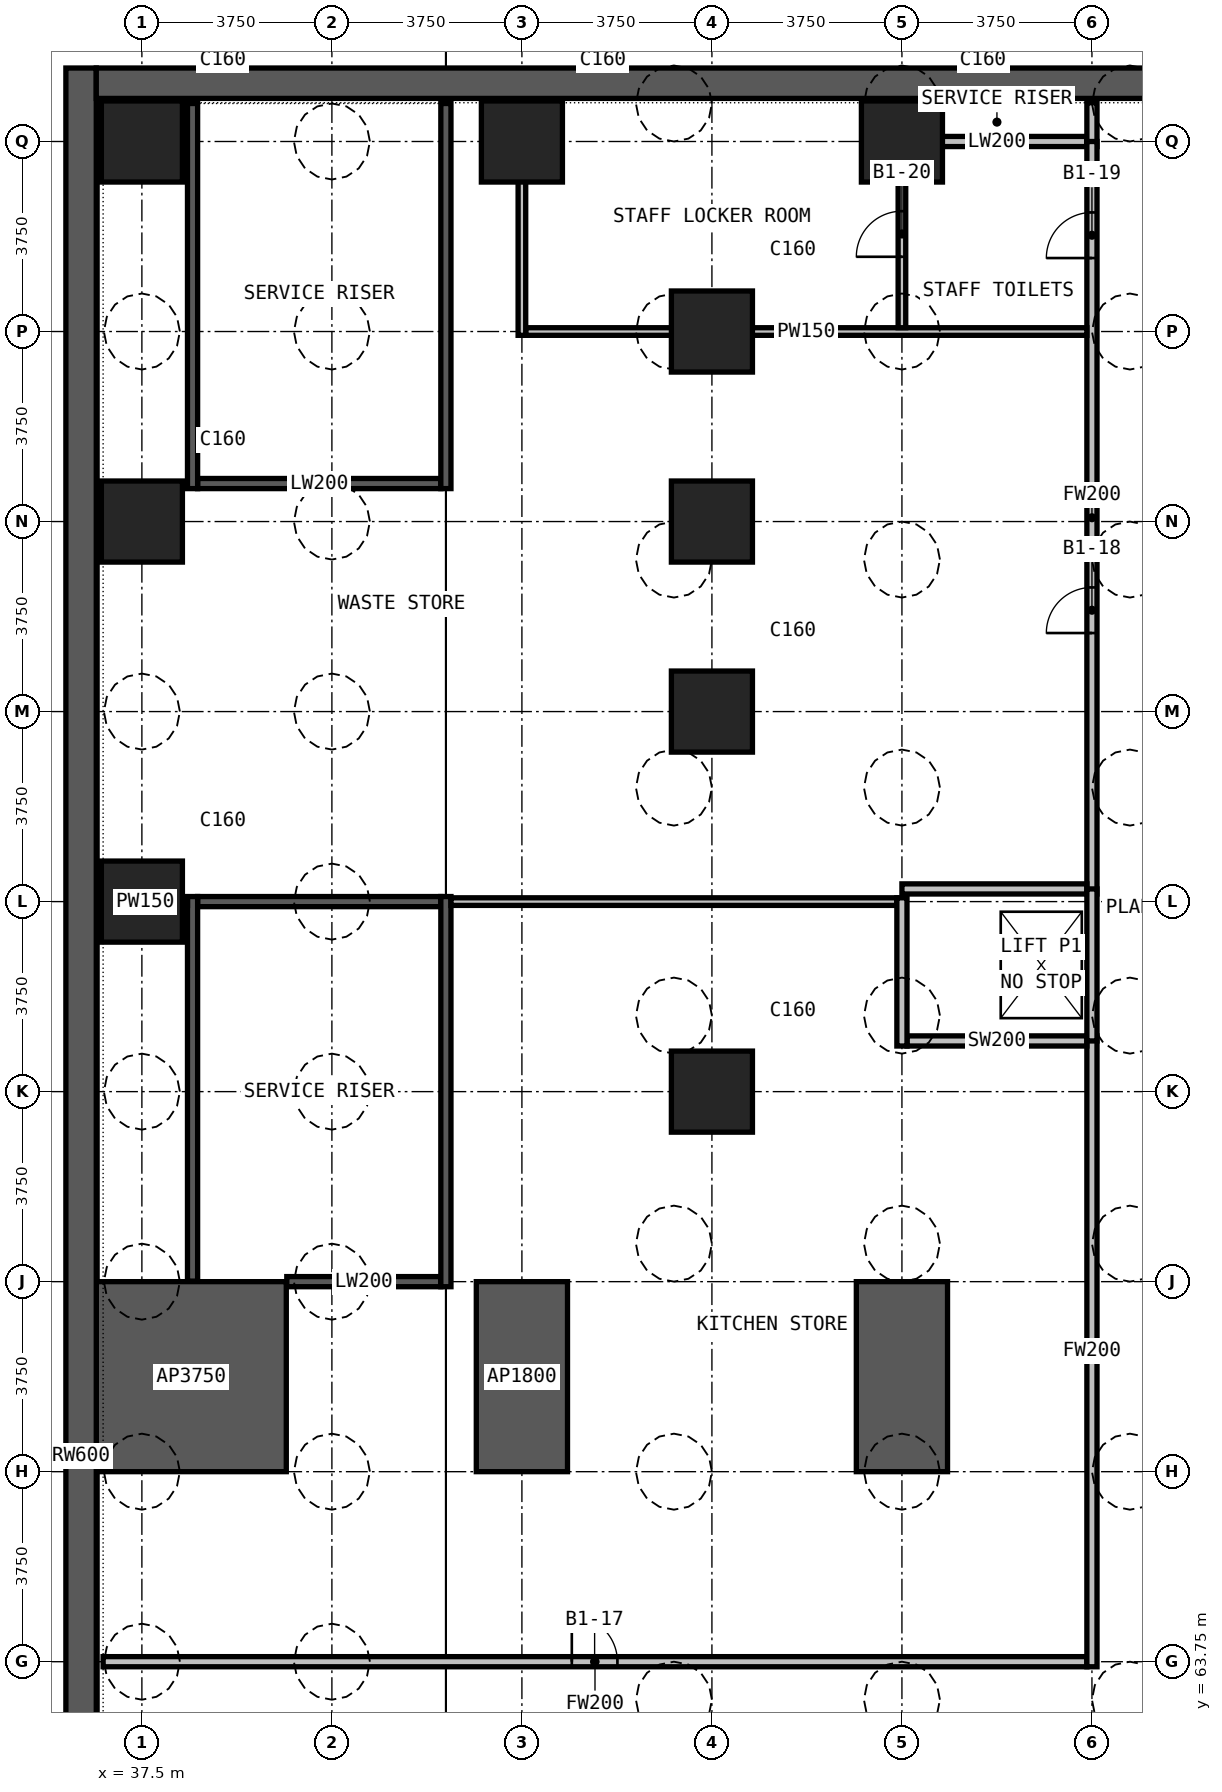
"""IFC4 building model, lengths in metres.
Left out: names, types, materials, properties, quantities, classifications, styles, units other than length and angle.
Written with IfcOpenShell. Run it as: python <this file> out.ifc"""

import sys

from ifc_helpers import new_model, si_unit, direction, frame, frame_2d, origin, origin_2d, place, context, subcontext, project, spatial, rectangle, extrude, element, fill, save


model = new_model("IFC4")
c1 = context("Model", 3, precision=1e-05, world=origin(), true_north=direction((0.0, 1.0)))
c2 = subcontext(c1, "Body", "Model", "MODEL_VIEW")
j1 = project(units=[si_unit("LENGTHUNIT", "METRE"), si_unit("PLANEANGLEUNIT", "RADIAN")], contexts=[c1])
p1 = place(None, origin())
s1 = spatial("IfcSite", under=j1, at=p1, CompositionType="ELEMENT")
p2 = place(p1, origin())
s2 = spatial("IfcBuilding", under=s1, at=p2, CompositionType="ELEMENT")
p3 = place(p2, frame((0.0, 0.0, -6.0)))
s3 = spatial("IfcBuildingStorey", under=s2, at=p3, CompositionType="ELEMENT", Elevation=-6.0)
p4 = place(p3, frame((38.475, 67.5, 0.0), z_axis=(0.0, 0.0, 1.0), x_axis=(0.0, 1.0, 0.0)))
e1 = element("IfcWall", 1, at=p4, inside=s3, PredefinedType="SHEAR", context=c2, shape_type="SweptSolid", body=[
    extrude(rectangle(XDim=3.75, YDim=3.75, at=frame_2d((1.875, 0.0))), origin(), (0.0, 0.0, 1.0), 6.0),
])
for number, where, z_axis, x_axis in (
    (2, (45.0, 67.5, 0.0), (0.0, 0.0, 1.0), (0.0, 1.0, 0.0)),
    (3, (52.5, 67.5, 0.0), (0.0, 0.0, 1.0), (0.0, 1.0, 0.0)),
):
    element("IfcWall", number, at=place(p3, frame(where, z_axis=z_axis, x_axis=x_axis)), inside=s3, PredefinedType="SHEAR", context=c2, shape_type="SweptSolid", body=[
        extrude(rectangle(XDim=3.75, YDim=1.8, at=frame_2d((1.875, 0.0))), origin(), (0.0, 0.0, 1.0), 6.0),
    ])
p5 = place(p3, frame((36.3, 40.4, -0.4), z_axis=(0.0, 0.0, 1.0), x_axis=(0.0, 1.0, 0.0)))
e4 = element("IfcWall", 4, at=p5, inside=s3, PredefinedType="SOLIDWALL", context=c2, shape_type="SweptSolid", body=[
    extrude(rectangle(XDim=54.8, YDim=0.6, at=frame_2d((27.4, 0.0))), origin(), (0.0, 0.0, 1.0), 6.4),
])
p6 = place(p3, frame((36.6, 94.9, -0.4), z_axis=(0.0, 0.0, 1.0), x_axis=(1.0, 0.0, 0.0)))
e5 = element("IfcWall", 5, at=p6, inside=s3, PredefinedType="SOLIDWALL", context=c2, shape_type="SweptSolid", body=[
    extrude(rectangle(XDim=76.8, YDim=0.6, at=frame_2d((38.4, 0.0))), origin(), (0.0, 0.0, 1.0), 6.4),
])
for number, where, z_axis, x_axis in (
    (6, (37.5, 78.75, 0.0), (0.0, 0.0, 1.0), (1.0, 0.0, 0.0)),
    (7, (37.5, 86.25, 0.0), (0.0, 0.0, 1.0), (1.0, 0.0, 0.0)),
    (8, (37.5, 93.75, 0.0), (0.0, 0.0, 1.0), (1.0, 0.0, 0.0)),
    (9, (45.0, 93.75, 0.0), (0.0, 0.0, 1.0), (1.0, 0.0, 0.0)),
    (10, (48.75, 75.0, 0.0), (0.0, 0.0, 1.0), (1.0, 0.0, 0.0)),
    (11, (48.75, 82.5, 0.0), (0.0, 0.0, 1.0), (1.0, 0.0, 0.0)),
    (12, (48.75, 86.25, 0.0), (0.0, 0.0, 1.0), (1.0, 0.0, 0.0)),
    (13, (48.75, 90.0, 0.0), (0.0, 0.0, 1.0), (1.0, 0.0, 0.0)),
    (14, (52.5, 93.75, 0.0), (0.0, 0.0, 1.0), (1.0, 0.0, 0.0)),
):
    element("IfcColumn", number, at=place(p3, frame(where, z_axis=z_axis, x_axis=x_axis)), inside=s3, PredefinedType="COLUMN", context=c2, shape_type="SweptSolid", body=[
        extrude(rectangle(XDim=1.6, YDim=1.6, at=origin_2d()), origin(), (0.0, 0.0, 1.0), 6.0),
    ])
p7 = place(p3, frame((40.36, 71.25, 0.0), z_axis=(0.0, 0.0, 1.0), x_axis=(1.0, 0.0, 0.0)))
e15 = element("IfcWall", 15, at=p7, inside=s3, PredefinedType="PARTITIONING", context=c2, shape_type="SweptSolid", body=[
    extrude(rectangle(XDim=3.04, YDim=0.2, at=frame_2d((1.52, 0.0))), origin(), (0.0, 0.0, 1.0), 5.65),
])
for number, where, z_axis, x_axis in (
    (16, (38.6, 78.75, 0.0), (0.0, 0.0, 1.0), (1.0, 0.0, 0.0)),
    (17, (38.6, 87.0, 0.0), (0.0, 0.0, 1.0), (1.0, 0.0, 0.0)),
):
    element("IfcWall", number, at=place(p3, frame(where, z_axis=z_axis, x_axis=x_axis)), inside=s3, PredefinedType="PARTITIONING", context=c2, shape_type="SweptSolid", body=[
        extrude(rectangle(XDim=4.8, YDim=0.2, at=frame_2d((2.4, 0.0))), origin(), (0.0, 0.0, 1.0), 5.65),
    ])
p8 = place(p3, frame((52.6, 93.75, 0.0), z_axis=(0.0, 0.0, 1.0), x_axis=(1.0, 0.0, 0.0)))
e18 = element("IfcWall", 18, at=p8, inside=s3, PredefinedType="PARTITIONING", context=c2, shape_type="SweptSolid", body=[
    extrude(rectangle(XDim=3.55, YDim=0.2, at=frame_2d((1.775, 0.0))), origin(), (0.0, 0.0, 1.0), 5.65),
])
p9 = place(p3, frame((38.5, 71.26, 0.0), z_axis=(0.0, 0.0, 1.0), x_axis=(0.0, 1.0, 0.0)))
e19 = element("IfcWall", 19, at=p9, inside=s3, PredefinedType="PARTITIONING", context=c2, shape_type="SweptSolid", body=[
    extrude(rectangle(XDim=7.59, YDim=0.2, at=frame_2d((3.795, 0.0))), origin(), (0.0, 0.0, 1.0), 5.65),
])
p10 = place(p3, frame((38.5, 86.9, 0.0), z_axis=(0.0, 0.0, 1.0), x_axis=(0.0, 1.0, 0.0)))
e20 = element("IfcWall", 20, at=p10, inside=s3, PredefinedType="PARTITIONING", context=c2, shape_type="SweptSolid", body=[
    extrude(rectangle(XDim=7.6, YDim=0.2, at=frame_2d((3.8, 0.0))), origin(), (0.0, 0.0, 1.0), 5.65),
])
p11 = place(p3, frame((43.5, 71.15, 0.0), z_axis=(0.0, 0.0, 1.0), x_axis=(0.0, 1.0, 0.0)))
e21 = element("IfcWall", 21, at=p11, inside=s3, PredefinedType="PARTITIONING", context=c2, shape_type="SweptSolid", body=[
    extrude(rectangle(XDim=7.7, YDim=0.2, at=frame_2d((3.85, 0.0))), origin(), (0.0, 0.0, 1.0), 5.65),
])
p12 = place(p3, frame((43.5, 86.9, 0.0), z_axis=(0.0, 0.0, 1.0), x_axis=(0.0, 1.0, 0.0)))
e22 = element("IfcWall", 22, at=p12, inside=s3, PredefinedType="PARTITIONING", context=c2, shape_type="SweptSolid", body=[
    extrude(rectangle(XDim=7.6, YDim=0.2, at=frame_2d((3.8, 0.0))), origin(), (0.0, 0.0, 1.0), 5.65),
])
for number, where, z_axis, x_axis in (
    (23, (52.5, 93.65, 0.0), (0.0, 0.0, 1.0), (0.0, 1.0, 0.0)),
    (24, (56.25, 93.65, 0.0), (0.0, 0.0, 1.0), (0.0, 1.0, 0.0)),
):
    element("IfcWall", number, at=place(p3, frame(where, z_axis=z_axis, x_axis=x_axis)), inside=s3, PredefinedType="PARTITIONING", context=c2, shape_type="SweptSolid", body=[
        extrude(rectangle(XDim=0.865, YDim=0.2, at=frame_2d((0.433, 0.0))), origin(), (0.0, 0.0, 1.0), 5.65),
    ])
p13 = place(p3, frame((36.735, 63.75, 0.0), z_axis=(0.0, 0.0, 1.0), x_axis=(1.0, 0.0, 0.0)))
e25 = element("IfcWall", 25, at=p13, inside=s3, PredefinedType="PARTITIONING", context=c2, shape_type="SweptSolid", body=[
    extrude(rectangle(XDim=19.415, YDim=0.2, at=frame_2d((9.708, 0.0))), origin(), (0.0, 0.0, 1.0), 5.65),
])
p14 = place(p13, frame((9.25, 0.0, 0.0)))
e26 = element("IfcOpeningElement", 26, at=p14, cuts=e25, PredefinedType="OPENING", context=c2, shape_type="SweptSolid", body=[
    extrude(rectangle(XDim=0.9, YDim=2.2, at=frame_2d((0.45, 1.1))), frame((0.0, 0.11, 0.0), z_axis=(0.0, -1.0, 0.0), x_axis=(1.0, 0.0, 0.0)), (0.0, 0.0, 1.0), 0.22),
])
p15 = place(p3, frame((56.25, 63.65, 0.0), z_axis=(0.0, 0.0, 1.0), x_axis=(0.0, 1.0, 0.0)))
e27 = element("IfcWall", 27, at=p15, inside=s3, PredefinedType="PARTITIONING", context=c2, shape_type="SweptSolid", body=[
    extrude(rectangle(XDim=12.45, YDim=0.2, at=frame_2d((6.225, 0.0))), origin(), (0.0, 0.0, 1.0), 5.65),
])
p16 = place(p3, frame((56.25, 78.9, 0.0), z_axis=(0.0, 0.0, 1.0), x_axis=(0.0, 1.0, 0.0)))
e28 = element("IfcWall", 28, at=p16, inside=s3, PredefinedType="PARTITIONING", context=c2, shape_type="SweptSolid", body=[
    extrude(rectangle(XDim=14.85, YDim=0.2, at=frame_2d((7.425, 0.0))), origin(), (0.0, 0.0, 1.0), 5.65),
])
p17 = place(p16, frame((5.15, 0.0, 0.0)))
e29 = element("IfcOpeningElement", 29, at=p17, cuts=e28, PredefinedType="OPENING", context=c2, shape_type="SweptSolid", body=[
    extrude(rectangle(XDim=0.9, YDim=2.2, at=frame_2d((0.45, 1.1))), frame((0.0, 0.11, 0.0), z_axis=(0.0, -1.0, 0.0), x_axis=(1.0, 0.0, 0.0)), (0.0, 0.0, 1.0), 0.22),
])
p18 = place(p16, frame((12.55, 0.0, 0.0)))
e30 = element("IfcOpeningElement", 30, at=p18, cuts=e28, PredefinedType="OPENING", context=c2, shape_type="SweptSolid", body=[
    extrude(rectangle(XDim=0.9, YDim=2.2, at=frame_2d((0.45, 1.1))), frame((0.0, 0.11, 0.0), z_axis=(0.0, -1.0, 0.0), x_axis=(1.0, 0.0, 0.0)), (0.0, 0.0, 1.0), 0.22),
])
p19 = place(p3, frame((36.735, 78.75, 0.0), z_axis=(0.0, 0.0, 1.0), x_axis=(1.0, 0.0, 0.0)))
e31 = element("IfcWall", 31, at=p19, inside=s3, PredefinedType="PARTITIONING", context=c2, shape_type="SweptSolid", body=[
    extrude(rectangle(XDim=1.665, YDim=0.15, at=frame_2d((0.833, 0.0))), origin(), (0.0, 0.0, 1.0), 5.65),
])
p20 = place(p3, frame((43.6, 78.75, 0.0), z_axis=(0.0, 0.0, 1.0), x_axis=(1.0, 0.0, 0.0)))
e32 = element("IfcWall", 32, at=p20, inside=s3, PredefinedType="PARTITIONING", context=c2, shape_type="SweptSolid", body=[
    extrude(rectangle(XDim=8.8, YDim=0.15, at=frame_2d((4.4, 0.0))), origin(), (0.0, 0.0, 1.0), 5.65),
])
p21 = place(p3, frame((45.075, 90.0, 0.0), z_axis=(0.0, 0.0, 1.0), x_axis=(1.0, 0.0, 0.0)))
e33 = element("IfcWall", 33, at=p21, inside=s3, PredefinedType="PARTITIONING", context=c2, shape_type="SweptSolid", body=[
    extrude(rectangle(XDim=11.075, YDim=0.15, at=frame_2d((5.538, 0.0))), origin(), (0.0, 0.0, 1.0), 5.65),
])
p22 = place(p3, frame((45.0, 89.925, 0.0), z_axis=(0.0, 0.0, 1.0), x_axis=(0.0, 1.0, 0.0)))
e34 = element("IfcWall", 34, at=p22, inside=s3, PredefinedType="PARTITIONING", context=c2, shape_type="SweptSolid", body=[
    extrude(rectangle(XDim=4.59, YDim=0.15, at=frame_2d((2.295, 0.0))), origin(), (0.0, 0.0, 1.0), 5.65),
])
p23 = place(p3, frame((52.5, 90.075, 0.0), z_axis=(0.0, 0.0, 1.0), x_axis=(0.0, 1.0, 0.0)))
e35 = element("IfcWall", 35, at=p23, inside=s3, PredefinedType="PARTITIONING", context=c2, shape_type="SweptSolid", body=[
    extrude(rectangle(XDim=3.675, YDim=0.15, at=frame_2d((1.837, 0.0))), origin(), (0.0, 0.0, 1.0), 5.65),
])
p24 = place(p23, frame((1.4, 0.0, 0.0)))
e36 = element("IfcOpeningElement", 36, at=p24, cuts=e35, PredefinedType="OPENING", context=c2, shape_type="SweptSolid", body=[
    extrude(rectangle(XDim=0.9, YDim=2.2, at=frame_2d((0.45, 1.1))), frame((0.0, 0.085, 0.0), z_axis=(0.0, -1.0, 0.0), x_axis=(1.0, 0.0, 0.0)), (0.0, 0.0, 1.0), 0.17),
])
p25 = place(p3, frame((52.6, 76.0, 0.0), z_axis=(0.0, 0.0, 1.0), x_axis=(1.0, 0.0, 0.0)))
e37 = element("IfcWall", 37, at=p25, inside=s3, PredefinedType="PARTITIONING", context=c2, shape_type="SweptSolid", body=[
    extrude(rectangle(XDim=3.55, YDim=0.2, at=frame_2d((1.775, 0.0))), origin(), (0.0, 0.0, 1.0), 5.65),
])
p26 = place(p3, frame((52.5, 79.0, 0.0), z_axis=(0.0, 0.0, 1.0), x_axis=(1.0, 0.0, 0.0)))
e38 = element("IfcWall", 38, at=p26, inside=s3, PredefinedType="PARTITIONING", context=c2, shape_type="SweptSolid", body=[
    extrude(rectangle(XDim=3.65, YDim=0.2, at=frame_2d((1.825, 0.0))), origin(), (0.0, 0.0, 1.0), 5.65),
])
p27 = place(p3, frame((52.5, 75.9, 0.0), z_axis=(0.0, 0.0, 1.0), x_axis=(0.0, 1.0, 0.0)))
e39 = element("IfcWall", 39, at=p27, inside=s3, PredefinedType="PARTITIONING", context=c2, shape_type="SweptSolid", body=[
    extrude(rectangle(XDim=2.925, YDim=0.2, at=frame_2d((1.462, 0.0))), origin(), (0.0, 0.0, 1.0), 5.65),
])
p28 = place(p3, frame((56.25, 76.0, 0.0), z_axis=(0.0, 0.0, 1.0), x_axis=(0.0, 1.0, 0.0)))
e40 = element("IfcWall", 40, at=p28, inside=s3, PredefinedType="PARTITIONING", context=c2, shape_type="SweptSolid", body=[
    extrude(rectangle(XDim=3.0, YDim=0.2, at=frame_2d((1.5, 0.0))), origin(), (0.0, 0.0, 1.0), 5.65),
])
p29 = place(p14, origin())
e41 = element("IfcDoor", 41, at=p29, inside=s3, OperationType="SINGLE_SWING_RIGHT", PredefinedType="DOOR", context=c2, shape_type="SweptSolid", body=[
    extrude(rectangle(XDim=0.9, YDim=2.2, at=frame_2d((0.45, 1.1))), frame((0.0, 0.025, 0.0), z_axis=(0.0, -1.0, 0.0), x_axis=(1.0, 0.0, 0.0)), (0.0, 0.0, 1.0), 0.05),
])
fill(e26, e41)
p30 = place(p17, origin())
e42 = element("IfcDoor", 42, at=p30, inside=s3, OperationType="SINGLE_SWING_RIGHT", PredefinedType="DOOR", context=c2, shape_type="SweptSolid", body=[
    extrude(rectangle(XDim=0.9, YDim=2.2, at=frame_2d((0.45, 1.1))), frame((0.0, 0.025, 0.0), z_axis=(0.0, -1.0, 0.0), x_axis=(1.0, 0.0, 0.0)), (0.0, 0.0, 1.0), 0.05),
])
fill(e29, e42)
p31 = place(p18, origin())
e43 = element("IfcDoor", 43, at=p31, inside=s3, OperationType="SINGLE_SWING_LEFT", PredefinedType="DOOR", context=c2, shape_type="SweptSolid", body=[
    extrude(rectangle(XDim=0.9, YDim=2.2, at=frame_2d((0.45, 1.1))), frame((0.0, 0.025, 0.0), z_axis=(0.0, -1.0, 0.0), x_axis=(1.0, 0.0, 0.0)), (0.0, 0.0, 1.0), 0.05),
])
fill(e30, e43)
p32 = place(p24, origin())
e44 = element("IfcDoor", 44, at=p32, inside=s3, OperationType="SINGLE_SWING_RIGHT", PredefinedType="DOOR", context=c2, shape_type="SweptSolid", body=[
    extrude(rectangle(XDim=0.9, YDim=2.2, at=frame_2d((0.45, 1.1))), frame((0.0, 0.025, 0.0), z_axis=(0.0, -1.0, 0.0), x_axis=(1.0, 0.0, 0.0)), (0.0, 0.0, 1.0), 0.05),
])
fill(e36, e44)
save(model, sys.argv[1])
